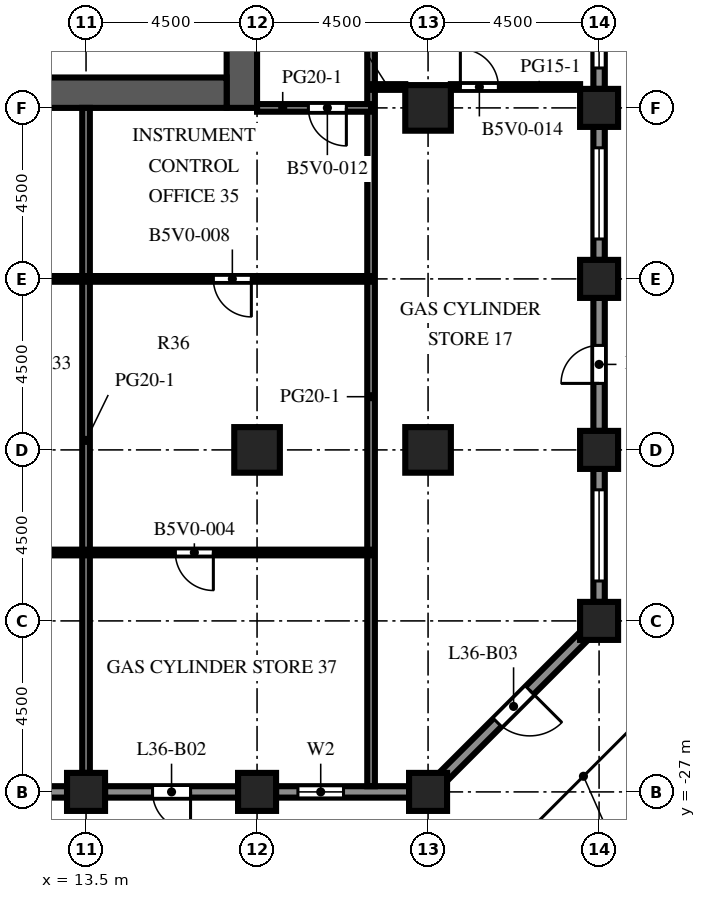
"""IFC4 building model, lengths in metres.
Left out: names, types, materials, properties, quantities, classifications, styles, units other than length and angle.
Written with IfcOpenShell. Run it as: python <this file> out.ifc"""

import sys

from ifc_helpers import new_model, si_unit, direction, frame, frame_2d, origin, origin_2d, place, context, subcontext, project, spatial, rectangle, extrude, element, fill, save


model = new_model("IFC4")
c1 = context("Model", 3, precision=1e-05, world=origin(), true_north=direction((0.0, 1.0)))
c2 = subcontext(c1, "Body", "Model", "MODEL_VIEW")
j1 = project(units=[si_unit("LENGTHUNIT", "METRE"), si_unit("PLANEANGLEUNIT", "RADIAN")], contexts=[c1])
p1 = place(None, origin())
s1 = spatial("IfcSite", under=j1, at=p1, CompositionType="ELEMENT")
p2 = place(p1, origin())
s2 = spatial("IfcBuilding", under=s1, at=p2, CompositionType="ELEMENT")
p3 = place(p2, frame((0.0, 0.0, 160.9)))
s3 = spatial("IfcBuildingStorey", under=s2, at=p3, CompositionType="ELEMENT", Elevation=160.9)
for number, where, z_axis, x_axis in (
    (1, (13.5, -27.0, 0.0), (0.0, 0.0, 1.0), (1.0, 0.0, 0.0)),
    (2, (18.0, -27.0, 0.0), (0.0, 0.0, 1.0), (1.0, 0.0, 0.0)),
    (3, (22.5, -27.0, 0.0), (0.0, 0.0, 1.0), (1.0, 0.0, 0.0)),
    (4, (27.0, -22.5, 0.0), (0.0, 0.0, 1.0), (1.0, 0.0, 0.0)),
    (5, (27.0, -18.0, 0.0), (0.0, 0.0, 1.0), (1.0, 0.0, 0.0)),
    (6, (27.0, -13.5, 0.0), (0.0, 0.0, 1.0), (1.0, 0.0, 0.0)),
    (7, (27.0, -9.0, 0.0), (0.0, 0.0, 1.0), (1.0, 0.0, 0.0)),
):
    element("IfcColumn", number, at=place(p3, frame(where, z_axis=z_axis, x_axis=x_axis)), inside=s3, PredefinedType="COLUMN", context=c2, shape_type="SweptSolid", body=[
        extrude(rectangle(XDim=1.0, YDim=1.0, at=origin_2d()), origin(), (0.0, 0.0, 1.0), 4.1),
    ])
for number, where, z_axis, x_axis in (
    (8, (18.0, -18.0, 0.0), (0.0, 0.0, 1.0), (1.0, 0.0, 0.0)),
    (9, (22.5, -18.0, 0.0), (0.0, 0.0, 1.0), (1.0, 0.0, 0.0)),
    (10, (22.5, -9.0, 0.0), (0.0, 0.0, 1.0), (1.0, 0.0, 0.0)),
):
    element("IfcColumn", number, at=place(p3, frame(where, z_axis=z_axis, x_axis=x_axis)), inside=s3, PredefinedType="COLUMN", context=c2, shape_type="SweptSolid", body=[
        extrude(rectangle(XDim=1.2, YDim=1.2, at=origin_2d()), origin(), (0.0, 0.0, 1.0), 4.1),
    ])
p4 = place(p3, frame((17.6, -9.0, 0.0), z_axis=(0.0, 0.0, 1.0), x_axis=(0.0, 1.0, 0.0)))
e11 = element("IfcWall", 11, at=p4, inside=s3, PredefinedType="SHEAR", context=c2, shape_type="SweptSolid", body=[
    extrude(rectangle(XDim=27.5, YDim=0.8, at=frame_2d((13.75, 0.0))), origin(), (0.0, 0.0, 1.0), 4.1),
])
p5 = place(p4, frame((12.55, 0.0, 0.0)))
e12 = element("IfcOpeningElement", 12, at=p5, cuts=e11, PredefinedType="OPENING", context=c2, shape_type="SweptSolid", body=[
    extrude(rectangle(XDim=2.4, YDim=2.4, at=frame_2d((1.2, 1.2))), frame((0.0, 0.41, 0.0), z_axis=(0.0, -1.0, 0.0), x_axis=(1.0, 0.0, 0.0)), (0.0, 0.0, 1.0), 0.82),
])
p6 = place(p4, frame((6.825, 0.0, 0.0)))
e13 = element("IfcOpeningElement", 13, at=p6, cuts=e11, PredefinedType="OPENING", context=c2, shape_type="SweptSolid", body=[
    extrude(rectangle(XDim=1.2, YDim=2.1, at=frame_2d((0.6, 1.05))), frame((0.0, 0.41, 0.0), z_axis=(0.0, -1.0, 0.0), x_axis=(1.0, 0.0, 0.0)), (0.0, 0.0, 1.0), 0.82),
])
p7 = place(p4, frame((19.475, 0.0, 0.0)))
e14 = element("IfcOpeningElement", 14, at=p7, cuts=e11, PredefinedType="OPENING", context=c2, shape_type="SweptSolid", body=[
    extrude(rectangle(XDim=1.2, YDim=2.1, at=frame_2d((0.6, 1.05))), frame((0.0, 0.41, 0.0), z_axis=(0.0, -1.0, 0.0), x_axis=(1.0, 0.0, 0.0)), (0.0, 0.0, 1.0), 0.82),
])
p8 = place(p3, frame((6.8, -8.6, 0.0), z_axis=(0.0, 0.0, 1.0), x_axis=(1.0, 0.0, 0.0)))
e15 = element("IfcWall", 15, at=p8, inside=s3, PredefinedType="SHEAR", context=c2, shape_type="SweptSolid", body=[
    extrude(rectangle(XDim=10.4, YDim=0.8, at=frame_2d((5.2, 0.0))), origin(), (0.0, 0.0, 1.0), 4.1),
])
p9 = place(p3, frame((13.0, -27.0, 0.0), z_axis=(0.0, 0.0, 1.0), x_axis=(-1.0, 0.0, 0.0)))
e16 = element("IfcWall", 16, at=p9, inside=s3, PredefinedType="SOLIDWALL", context=c2, shape_type="SweptSolid", body=[
    extrude(rectangle(XDim=3.5, YDim=0.3, at=frame_2d((1.75, 0.0))), origin(), (0.0, 0.0, 1.0), 2.85),
])
p10 = place(p9, frame((0.55, 0.0, 0.8)))
e17 = element("IfcOpeningElement", 17, at=p10, cuts=e16, PredefinedType="OPENING", context=c2, shape_type="SweptSolid", body=[
    extrude(rectangle(XDim=2.4, YDim=1.7, at=frame_2d((1.2, 0.85))), frame((0.0, 0.16, 0.0), z_axis=(0.0, -1.0, 0.0), x_axis=(1.0, 0.0, 0.0)), (0.0, 0.0, 1.0), 0.32),
])
p11 = place(p3, frame((17.5, -27.0, 0.0), z_axis=(0.0, 0.0, 1.0), x_axis=(-1.0, 0.0, 0.0)))
e18 = element("IfcWall", 18, at=p11, inside=s3, PredefinedType="SOLIDWALL", context=c2, shape_type="SweptSolid", body=[
    extrude(rectangle(XDim=3.5, YDim=0.3, at=frame_2d((1.75, 0.0))), origin(), (0.0, 0.0, 1.0), 2.85),
])
p12 = place(p11, frame((1.25, 0.0, 0.0)))
e19 = element("IfcOpeningElement", 19, at=p12, cuts=e18, PredefinedType="OPENING", context=c2, shape_type="SweptSolid", body=[
    extrude(rectangle(XDim=1.0, YDim=2.2, at=frame_2d((0.5, 1.1))), frame((0.0, 0.16, 0.0), z_axis=(0.0, -1.0, 0.0), x_axis=(1.0, 0.0, 0.0)), (0.0, 0.0, 1.0), 0.32),
])
p13 = place(p3, frame((22.0, -27.0, 0.0), z_axis=(0.0, 0.0, 1.0), x_axis=(-1.0, 0.0, 0.0)))
e20 = element("IfcWall", 20, at=p13, inside=s3, PredefinedType="SOLIDWALL", context=c2, shape_type="SweptSolid", body=[
    extrude(rectangle(XDim=3.5, YDim=0.3, at=frame_2d((1.75, 0.0))), origin(), (0.0, 0.0, 1.0), 2.85),
])
p14 = place(p13, frame((1.725, 0.0, 0.8)))
e21 = element("IfcOpeningElement", 21, at=p14, cuts=e20, PredefinedType="OPENING", context=c2, shape_type="SweptSolid", body=[
    extrude(rectangle(XDim=1.2, YDim=1.7, at=frame_2d((0.6, 0.85))), frame((0.0, 0.16, 0.0), z_axis=(0.0, -1.0, 0.0), x_axis=(1.0, 0.0, 0.0)), (0.0, 0.0, 1.0), 0.32),
])
p15 = place(p3, frame((26.606, -22.894, 0.0), z_axis=(0.0, 0.0, 1.0), x_axis=(-0.707106781187, -0.707106781187, 0.0)))
e22 = element("IfcWall", 22, at=p15, inside=s3, PredefinedType="SOLIDWALL", context=c2, shape_type="SweptSolid", body=[
    extrude(rectangle(XDim=5.25, YDim=0.3, at=frame_2d((2.625, 0.0))), origin(), (0.0, 0.0, 1.0), 2.85),
])
p16 = place(p15, frame((2.025, 0.0, 0.0)))
e23 = element("IfcOpeningElement", 23, at=p16, cuts=e22, PredefinedType="OPENING", context=c2, shape_type="SweptSolid", body=[
    extrude(rectangle(XDim=1.2, YDim=2.2, at=frame_2d((0.6, 1.1))), frame((0.0, 0.16, 0.0), z_axis=(0.0, -1.0, 0.0), x_axis=(1.0, 0.0, 0.0)), (0.0, 0.0, 1.0), 0.32),
])
p17 = place(p3, frame((27.0, -18.5, 0.0), z_axis=(0.0, 0.0, 1.0), x_axis=(0.0, -1.0, 0.0)))
e24 = element("IfcWall", 24, at=p17, inside=s3, PredefinedType="SOLIDWALL", context=c2, shape_type="SweptSolid", body=[
    extrude(rectangle(XDim=3.5, YDim=0.3, at=frame_2d((1.75, 0.0))), origin(), (0.0, 0.0, 1.0), 2.85),
])
p18 = place(p17, frame((0.55, 0.0, 0.8)))
e25 = element("IfcOpeningElement", 25, at=p18, cuts=e24, PredefinedType="OPENING", context=c2, shape_type="SweptSolid", body=[
    extrude(rectangle(XDim=2.4, YDim=1.7, at=frame_2d((1.2, 0.85))), frame((0.0, 0.16, 0.0), z_axis=(0.0, -1.0, 0.0), x_axis=(1.0, 0.0, 0.0)), (0.0, 0.0, 1.0), 0.32),
])
p19 = place(p3, frame((27.0, -14.0, 0.0), z_axis=(0.0, 0.0, 1.0), x_axis=(0.0, -1.0, 0.0)))
e26 = element("IfcWall", 26, at=p19, inside=s3, PredefinedType="SOLIDWALL", context=c2, shape_type="SweptSolid", body=[
    extrude(rectangle(XDim=3.5, YDim=0.3, at=frame_2d((1.75, 0.0))), origin(), (0.0, 0.0, 1.0), 2.85),
])
p20 = place(p19, frame((1.25, 0.0, 0.0)))
e27 = element("IfcOpeningElement", 27, at=p20, cuts=e26, PredefinedType="OPENING", context=c2, shape_type="SweptSolid", body=[
    extrude(rectangle(XDim=1.0, YDim=2.2, at=frame_2d((0.5, 1.1))), frame((0.0, 0.16, 0.0), z_axis=(0.0, -1.0, 0.0), x_axis=(1.0, 0.0, 0.0)), (0.0, 0.0, 1.0), 0.32),
])
p21 = place(p3, frame((27.0, -9.5, 0.0), z_axis=(0.0, 0.0, 1.0), x_axis=(0.0, -1.0, 0.0)))
e28 = element("IfcWall", 28, at=p21, inside=s3, PredefinedType="SOLIDWALL", context=c2, shape_type="SweptSolid", body=[
    extrude(rectangle(XDim=3.5, YDim=0.3, at=frame_2d((1.75, 0.0))), origin(), (0.0, 0.0, 1.0), 2.85),
])
p22 = place(p21, frame((0.55, 0.0, 0.8)))
e29 = element("IfcOpeningElement", 29, at=p22, cuts=e28, PredefinedType="OPENING", context=c2, shape_type="SweptSolid", body=[
    extrude(rectangle(XDim=2.4, YDim=1.7, at=frame_2d((1.2, 0.85))), frame((0.0, 0.16, 0.0), z_axis=(0.0, -1.0, 0.0), x_axis=(1.0, 0.0, 0.0)), (0.0, 0.0, 1.0), 0.32),
])
p23 = place(p3, frame((27.0, -5.0, 0.0), z_axis=(0.0, 0.0, 1.0), x_axis=(0.0, -1.0, 0.0)))
e30 = element("IfcWall", 30, at=p23, inside=s3, PredefinedType="SOLIDWALL", context=c2, shape_type="SweptSolid", body=[
    extrude(rectangle(XDim=3.5, YDim=0.3, at=frame_2d((1.75, 0.0))), origin(), (0.0, 0.0, 1.0), 2.85),
])
p24 = place(p23, frame((0.55, 0.0, 0.8)))
e31 = element("IfcOpeningElement", 31, at=p24, cuts=e30, PredefinedType="OPENING", context=c2, shape_type="SweptSolid", body=[
    extrude(rectangle(XDim=2.4, YDim=1.7, at=frame_2d((1.2, 0.85))), frame((0.0, 0.16, 0.0), z_axis=(0.0, -1.0, 0.0), x_axis=(1.0, 0.0, 0.0)), (0.0, 0.0, 1.0), 0.32),
])
p25 = place(p3, frame((13.5, -26.5, 0.0), z_axis=(0.0, 0.0, 1.0), x_axis=(0.0, 1.0, 0.0)))
e32 = element("IfcWall", 32, at=p25, inside=s3, PredefinedType="PARTITIONING", context=c2, shape_type="SweptSolid", body=[
    extrude(rectangle(XDim=17.5, YDim=0.2, at=frame_2d((8.75, 0.0))), origin(), (0.0, 0.0, 1.0), 3.65),
])
p26 = place(p3, frame((21.0, 3.25, 0.0), z_axis=(0.0, 0.0, 1.0), x_axis=(0.0, -1.0, 0.0)))
e33 = element("IfcWall", 33, at=p26, inside=s3, PredefinedType="PARTITIONING", context=c2, shape_type="SweptSolid", body=[
    extrude(rectangle(XDim=30.1, YDim=0.2, at=frame_2d((15.05, 0.0))), origin(), (0.0, 0.0, 1.0), 3.65),
])
p27 = place(p26, frame((8.6, 0.0, 0.0)))
e34 = element("IfcOpeningElement", 34, at=p27, cuts=e33, PredefinedType="OPENING", context=c2, shape_type="SweptSolid", body=[
    extrude(rectangle(XDim=1.0, YDim=2.1, at=frame_2d((0.5, 1.05))), frame((0.0, 0.11, 0.0), z_axis=(0.0, -1.0, 0.0), x_axis=(1.0, 0.0, 0.0)), (0.0, 0.0, 1.0), 0.22),
])
p28 = place(p3, frame((21.0, -20.7, 0.0), z_axis=(0.0, 0.0, 1.0), x_axis=(-1.0, 0.0, 0.0)))
e35 = element("IfcWall", 35, at=p28, inside=s3, PredefinedType="PARTITIONING", context=c2, shape_type="SweptSolid", body=[
    extrude(rectangle(XDim=34.5, YDim=0.15, at=frame_2d((17.25, 0.0))), origin(), (0.0, 0.0, 1.0), 3.65),
])
p29 = place(p28, frame((26.15, 0.0, 0.0)))
e36 = element("IfcOpeningElement", 36, at=p29, cuts=e35, PredefinedType="OPENING", context=c2, shape_type="SweptSolid", body=[
    extrude(rectangle(XDim=1.0, YDim=2.1, at=frame_2d((0.5, 1.05))), frame((0.0, 0.085, 0.0), z_axis=(0.0, -1.0, 0.0), x_axis=(1.0, 0.0, 0.0)), (0.0, 0.0, 1.0), 0.17),
])
p30 = place(p28, frame((18.65, 0.0, 0.0)))
e37 = element("IfcOpeningElement", 37, at=p30, cuts=e35, PredefinedType="OPENING", context=c2, shape_type="SweptSolid", body=[
    extrude(rectangle(XDim=1.0, YDim=2.1, at=frame_2d((0.5, 1.05))), frame((0.0, 0.085, 0.0), z_axis=(0.0, -1.0, 0.0), x_axis=(1.0, 0.0, 0.0)), (0.0, 0.0, 1.0), 0.17),
])
p31 = place(p28, frame((10.65, 0.0, 0.0)))
e38 = element("IfcOpeningElement", 38, at=p31, cuts=e35, PredefinedType="OPENING", context=c2, shape_type="SweptSolid", body=[
    extrude(rectangle(XDim=1.0, YDim=2.1, at=frame_2d((0.5, 1.05))), frame((0.0, 0.085, 0.0), z_axis=(0.0, -1.0, 0.0), x_axis=(1.0, 0.0, 0.0)), (0.0, 0.0, 1.0), 0.17),
])
p32 = place(p28, frame((4.15, 0.0, 0.0)))
e39 = element("IfcOpeningElement", 39, at=p32, cuts=e35, PredefinedType="OPENING", context=c2, shape_type="SweptSolid", body=[
    extrude(rectangle(XDim=1.0, YDim=2.1, at=frame_2d((0.5, 1.05))), frame((0.0, 0.085, 0.0), z_axis=(0.0, -1.0, 0.0), x_axis=(1.0, 0.0, 0.0)), (0.0, 0.0, 1.0), 0.17),
])
p33 = place(p3, frame((21.0, -13.5, 0.0), z_axis=(0.0, 0.0, 1.0), x_axis=(-1.0, 0.0, 0.0)))
e40 = element("IfcWall", 40, at=p33, inside=s3, PredefinedType="PARTITIONING", context=c2, shape_type="SweptSolid", body=[
    extrude(rectangle(XDim=34.5, YDim=0.15, at=frame_2d((17.25, 0.0))), origin(), (0.0, 0.0, 1.0), 3.65),
])
p34 = place(p33, frame((26.15, 0.0, 0.0)))
e41 = element("IfcOpeningElement", 41, at=p34, cuts=e40, PredefinedType="OPENING", context=c2, shape_type="SweptSolid", body=[
    extrude(rectangle(XDim=1.0, YDim=2.1, at=frame_2d((0.5, 1.05))), frame((0.0, 0.085, 0.0), z_axis=(0.0, -1.0, 0.0), x_axis=(1.0, 0.0, 0.0)), (0.0, 0.0, 1.0), 0.17),
])
p35 = place(p33, frame((18.65, 0.0, 0.0)))
e42 = element("IfcOpeningElement", 42, at=p35, cuts=e40, PredefinedType="OPENING", context=c2, shape_type="SweptSolid", body=[
    extrude(rectangle(XDim=1.0, YDim=2.1, at=frame_2d((0.5, 1.05))), frame((0.0, 0.085, 0.0), z_axis=(0.0, -1.0, 0.0), x_axis=(1.0, 0.0, 0.0)), (0.0, 0.0, 1.0), 0.17),
])
p36 = place(p33, frame((11.4, 0.0, 0.0)))
e43 = element("IfcOpeningElement", 43, at=p36, cuts=e40, PredefinedType="OPENING", context=c2, shape_type="SweptSolid", body=[
    extrude(rectangle(XDim=1.0, YDim=2.1, at=frame_2d((0.5, 1.05))), frame((0.0, 0.085, 0.0), z_axis=(0.0, -1.0, 0.0), x_axis=(1.0, 0.0, 0.0)), (0.0, 0.0, 1.0), 0.17),
])
p37 = place(p33, frame((3.15, 0.0, 0.0)))
e44 = element("IfcOpeningElement", 44, at=p37, cuts=e40, PredefinedType="OPENING", context=c2, shape_type="SweptSolid", body=[
    extrude(rectangle(XDim=1.0, YDim=2.1, at=frame_2d((0.5, 1.05))), frame((0.0, 0.085, 0.0), z_axis=(0.0, -1.0, 0.0), x_axis=(1.0, 0.0, 0.0)), (0.0, 0.0, 1.0), 0.17),
])
p38 = place(p3, frame((21.0, -9.0, 0.0), z_axis=(0.0, 0.0, 1.0), x_axis=(-1.0, 0.0, 0.0)))
e45 = element("IfcWall", 45, at=p38, inside=s3, PredefinedType="PARTITIONING", context=c2, shape_type="SweptSolid", body=[
    extrude(rectangle(XDim=3.0, YDim=0.2, at=frame_2d((1.5, 0.0))), origin(), (0.0, 0.0, 1.0), 3.65),
])
p39 = place(p38, frame((0.65, 0.0, 0.0)))
e46 = element("IfcOpeningElement", 46, at=p39, cuts=e45, PredefinedType="OPENING", context=c2, shape_type="SweptSolid", body=[
    extrude(rectangle(XDim=1.0, YDim=2.1, at=frame_2d((0.5, 1.05))), frame((0.0, 0.11, 0.0), z_axis=(0.0, -1.0, 0.0), x_axis=(1.0, 0.0, 0.0)), (0.0, 0.0, 1.0), 0.22),
])
p40 = place(p3, frame((21.0, -8.45, 0.0), z_axis=(0.0, 0.0, 1.0), x_axis=(1.0, 0.0, 0.0)))
e47 = element("IfcWall", 47, at=p40, inside=s3, PredefinedType="PARTITIONING", context=c2, shape_type="SweptSolid", body=[
    extrude(rectangle(XDim=0.9, YDim=0.15, at=frame_2d((0.45, 0.0))), origin(), (0.0, 0.0, 1.0), 3.65),
])
p41 = place(p3, frame((26.5, -8.45, 0.0), z_axis=(0.0, 0.0, 1.0), x_axis=(-1.0, 0.0, 0.0)))
e48 = element("IfcWall", 48, at=p41, inside=s3, PredefinedType="PARTITIONING", context=c2, shape_type="SweptSolid", body=[
    extrude(rectangle(XDim=3.4, YDim=0.15, at=frame_2d((1.7, 0.0))), origin(), (0.0, 0.0, 1.0), 3.65),
])
p42 = place(p41, frame((2.15, 0.0, 0.0)))
e49 = element("IfcOpeningElement", 49, at=p42, cuts=e48, PredefinedType="OPENING", context=c2, shape_type="SweptSolid", body=[
    extrude(rectangle(XDim=1.0, YDim=2.1, at=frame_2d((0.5, 1.05))), frame((0.0, 0.085, 0.0), z_axis=(0.0, -1.0, 0.0), x_axis=(1.0, 0.0, 0.0)), (0.0, 0.0, 1.0), 0.17),
])
p43 = place(p12, origin())
e50 = element("IfcDoor", 50, at=p43, inside=s3, OperationType="SINGLE_SWING_LEFT", PredefinedType="DOOR", context=c2, shape_type="SweptSolid", body=[
    extrude(rectangle(XDim=1.0, YDim=2.2, at=frame_2d((0.5, 1.1))), frame((0.0, 0.025, 0.0), z_axis=(0.0, -1.0, 0.0), x_axis=(1.0, 0.0, 0.0)), (0.0, 0.0, 1.0), 0.05),
])
fill(e19, e50)
p44 = place(p14, origin())
e51 = element("IfcWindow", 51, at=p44, inside=s3, PartitioningType="SINGLE_PANEL", PredefinedType="WINDOW", context=c2, shape_type="SweptSolid", body=[
    extrude(rectangle(XDim=1.2, YDim=1.7, at=frame_2d((0.6, 0.85))), frame((0.0, 0.03, 0.0), z_axis=(0.0, -1.0, 0.0), x_axis=(1.0, 0.0, 0.0)), (0.0, 0.0, 1.0), 0.06),
])
fill(e21, e51)
p45 = place(p16, origin())
e52 = element("IfcDoor", 52, at=p45, inside=s3, OperationType="SINGLE_SWING_LEFT", PredefinedType="DOOR", context=c2, shape_type="SweptSolid", body=[
    extrude(rectangle(XDim=1.2, YDim=2.2, at=frame_2d((0.6, 1.1))), frame((0.0, 0.025, 0.0), z_axis=(0.0, -1.0, 0.0), x_axis=(1.0, 0.0, 0.0)), (0.0, 0.0, 1.0), 0.05),
])
fill(e23, e52)
p46 = place(p18, origin())
e53 = element("IfcWindow", 53, at=p46, inside=s3, PartitioningType="SINGLE_PANEL", PredefinedType="WINDOW", context=c2, shape_type="SweptSolid", body=[
    extrude(rectangle(XDim=2.4, YDim=1.7, at=frame_2d((1.2, 0.85))), frame((0.0, 0.03, 0.0), z_axis=(0.0, -1.0, 0.0), x_axis=(1.0, 0.0, 0.0)), (0.0, 0.0, 1.0), 0.06),
])
fill(e25, e53)
p47 = place(p20, origin())
e54 = element("IfcDoor", 54, at=p47, inside=s3, OperationType="SINGLE_SWING_RIGHT", PredefinedType="DOOR", context=c2, shape_type="SweptSolid", body=[
    extrude(rectangle(XDim=1.0, YDim=2.2, at=frame_2d((0.5, 1.1))), frame((0.0, 0.025, 0.0), z_axis=(0.0, -1.0, 0.0), x_axis=(1.0, 0.0, 0.0)), (0.0, 0.0, 1.0), 0.05),
])
fill(e27, e54)
p48 = place(p22, origin())
e55 = element("IfcWindow", 55, at=p48, inside=s3, PartitioningType="SINGLE_PANEL", PredefinedType="WINDOW", context=c2, shape_type="SweptSolid", body=[
    extrude(rectangle(XDim=2.4, YDim=1.7, at=frame_2d((1.2, 0.85))), frame((0.0, 0.03, 0.0), z_axis=(0.0, -1.0, 0.0), x_axis=(1.0, 0.0, 0.0)), (0.0, 0.0, 1.0), 0.06),
])
fill(e29, e55)
p49 = place(p24, origin())
e56 = element("IfcWindow", 56, at=p49, inside=s3, PartitioningType="SINGLE_PANEL", PredefinedType="WINDOW", context=c2, shape_type="SweptSolid", body=[
    extrude(rectangle(XDim=2.4, YDim=1.7, at=frame_2d((1.2, 0.85))), frame((0.0, 0.03, 0.0), z_axis=(0.0, -1.0, 0.0), x_axis=(1.0, 0.0, 0.0)), (0.0, 0.0, 1.0), 0.06),
])
fill(e31, e56)
p50 = place(p32, origin())
e57 = element("IfcDoor", 57, at=p50, inside=s3, OperationType="SINGLE_SWING_LEFT", PredefinedType="DOOR", context=c2, shape_type="SweptSolid", body=[
    extrude(rectangle(XDim=1.0, YDim=2.1, at=frame_2d((0.5, 1.05))), frame((0.0, 0.025, 0.0), z_axis=(0.0, -1.0, 0.0), x_axis=(1.0, 0.0, 0.0)), (0.0, 0.0, 1.0), 0.05),
])
fill(e39, e57)
p51 = place(p37, origin())
e58 = element("IfcDoor", 58, at=p51, inside=s3, OperationType="SINGLE_SWING_LEFT", PredefinedType="DOOR", context=c2, shape_type="SweptSolid", body=[
    extrude(rectangle(XDim=1.0, YDim=2.1, at=frame_2d((0.5, 1.05))), frame((0.0, 0.025, 0.0), z_axis=(0.0, -1.0, 0.0), x_axis=(1.0, 0.0, 0.0)), (0.0, 0.0, 1.0), 0.05),
])
fill(e44, e58)
p52 = place(p39, origin())
e59 = element("IfcDoor", 59, at=p52, inside=s3, OperationType="SINGLE_SWING_LEFT", PredefinedType="DOOR", context=c2, shape_type="SweptSolid", body=[
    extrude(rectangle(XDim=1.0, YDim=2.1, at=frame_2d((0.5, 1.05))), frame((0.0, 0.025, 0.0), z_axis=(0.0, -1.0, 0.0), x_axis=(1.0, 0.0, 0.0)), (0.0, 0.0, 1.0), 0.05),
])
fill(e46, e59)
p53 = place(p42, origin())
e60 = element("IfcDoor", 60, at=p53, inside=s3, OperationType="SINGLE_SWING_RIGHT", PredefinedType="DOOR", context=c2, shape_type="SweptSolid", body=[
    extrude(rectangle(XDim=1.0, YDim=2.1, at=frame_2d((0.5, 1.05))), frame((0.0, 0.025, 0.0), z_axis=(0.0, -1.0, 0.0), x_axis=(1.0, 0.0, 0.0)), (0.0, 0.0, 1.0), 0.05),
])
fill(e49, e60)
save(model, sys.argv[1])
